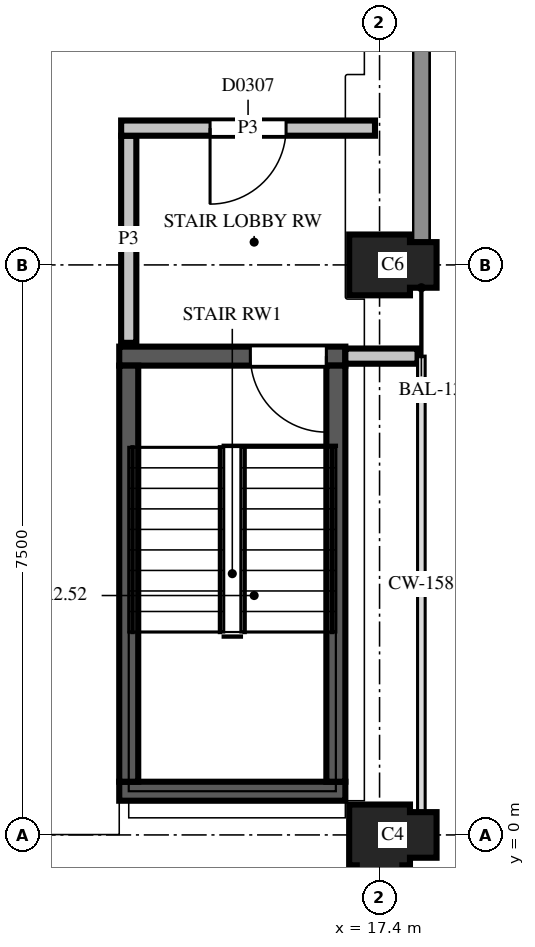
"""IFC4 building model, lengths in metres.
Left out: names, types, materials, properties, quantities, classifications, styles, units other than length and angle.
Written with IfcOpenShell. Run it as: python <this file> out.ifc"""

import sys

from ifc_helpers import new_model, si_unit, direction, frame, frame_2d, origin, place, context, subcontext, project, spatial, polyline, rectangle, outline, extrude, element, fill, save


model = new_model("IFC4")
c1 = context("Model", 3, precision=1e-05, world=origin(), true_north=direction((0.0, 1.0)))
c2 = subcontext(c1, "Body", "Model", "MODEL_VIEW")
j1 = project(units=[si_unit("LENGTHUNIT", "METRE"), si_unit("PLANEANGLEUNIT", "RADIAN")], contexts=[c1])
p1 = place(None, origin())
s1 = spatial("IfcSite", under=j1, at=p1, CompositionType="ELEMENT")
p2 = place(p1, origin())
s2 = spatial("IfcBuilding", under=s1, at=p2, CompositionType="ELEMENT")
p3 = place(p2, frame((0.0, 0.0, 11.9)))
s3 = spatial("IfcBuildingStorey", under=s2, at=p3, CompositionType="ELEMENT", Elevation=11.9)
p4 = place(p3, frame((17.4, 0.0, 0.0), z_axis=(0.0, 0.0, 1.0), x_axis=(0.0, -1.0, 0.0)))
e1 = element("IfcColumn", 1, at=p4, inside=s3, PredefinedType="COLUMN", context=c2, shape_type="SweptSolid", body=[
    extrude(outline(polyline([(-0.4, -0.4), (0.4, -0.4), (0.4, -0.3), (0.75, -0.3), (0.75, 0.3), (0.4, 0.3), (0.4, 0.4), (0.3, 0.4), (0.3, 0.75), (-0.3, 0.75), (-0.3, 0.4), (-0.4, 0.4), (-0.4, -0.4)])), origin(), (0.0, 0.0, 1.0), 3.7),
])
p5 = place(p3, frame((17.4, 7.5, 0.0), z_axis=(0.0, 0.0, 1.0), x_axis=(1.0, 0.0, 0.0)))
e2 = element("IfcColumn", 2, at=p5, inside=s3, PredefinedType="COLUMN", context=c2, shape_type="SweptSolid", body=[
    extrude(outline(polyline([(-0.4, -0.4), (0.4, -0.4), (0.4, -0.3), (0.75, -0.3), (0.75, 0.3), (0.4, 0.3), (0.4, 0.4), (-0.4, 0.4), (-0.4, -0.4)])), origin(), (0.0, 0.0, 1.0), 3.7),
])
p6 = place(p3, frame((13.975, 0.575, 0.0), z_axis=(0.0, 0.0, 1.0), x_axis=(1.0, 0.0, 0.0)))
e3 = element("IfcWall", 3, at=p6, inside=s3, PredefinedType="SHEAR", context=c2, shape_type="SweptSolid", body=[
    extrude(rectangle(XDim=2.975, YDim=0.25, at=frame_2d((1.487, 0.0))), origin(), (0.0, 0.0, 1.0), 3.7),
])
p7 = place(p3, frame((13.975, 6.3, 0.0), z_axis=(0.0, 0.0, 1.0), x_axis=(1.0, 0.0, 0.0)))
e4 = element("IfcWall", 4, at=p7, inside=s3, PredefinedType="SHEAR", context=c2, shape_type="SweptSolid", body=[
    extrude(rectangle(XDim=2.975, YDim=0.25, at=frame_2d((1.487, 0.0))), origin(), (0.0, 0.0, 1.0), 3.7),
])
p8 = place(p7, frame((1.725, 0.0, 0.0)))
e5 = element("IfcOpeningElement", 5, at=p8, cuts=e4, PredefinedType="OPENING", context=c2, shape_type="SweptSolid", body=[
    extrude(rectangle(XDim=1.0, YDim=2.1, at=frame_2d((0.5, 1.05))), frame((0.0, 0.135, 0.0), z_axis=(0.0, -1.0, 0.0), x_axis=(1.0, 0.0, 0.0)), (0.0, 0.0, 1.0), 0.27),
])
for number, where, z_axis, x_axis in (
    (6, (14.1, 0.7, 0.0), (0.0, 0.0, 1.0), (0.0, 1.0, 0.0)),
    (7, (16.825, 0.7, 0.0), (0.0, 0.0, 1.0), (0.0, 1.0, 0.0)),
):
    element("IfcWall", number, at=place(p3, frame(where, z_axis=z_axis, x_axis=x_axis)), inside=s3, PredefinedType="SHEAR", context=c2, shape_type="SweptSolid", body=[
        extrude(rectangle(XDim=5.475, YDim=0.25, at=frame_2d((2.738, 0.0))), origin(), (0.0, 0.0, 1.0), 3.7),
    ])
p9 = place(p3, frame((16.95, 6.3, 0.0), z_axis=(0.0, 0.0, 1.0), x_axis=(1.0, 0.0, 0.0)))
e8 = element("IfcWall", 8, at=p9, inside=s3, PredefinedType="PARTITIONING", context=c2, shape_type="SweptSolid", body=[
    extrude(rectangle(XDim=0.95, YDim=0.2, at=frame_2d((0.475, 0.0))), origin(), (0.0, 0.0, 1.0), 2.88),
])
p10 = place(p3, frame((14.1, 9.2, 0.0), z_axis=(0.0, 0.0, 1.0), x_axis=(0.0, -1.0, 0.0)))
e9 = element("IfcWall", 9, at=p10, inside=s3, PredefinedType="PARTITIONING", context=c2, shape_type="SweptSolid", body=[
    extrude(rectangle(XDim=2.725, YDim=0.2, at=frame_2d((1.362, 0.0))), origin(), (0.0, 0.0, 1.0), 2.88),
])
p11 = place(p3, frame((17.34, 9.3, 0.0), z_axis=(0.0, 0.0, 1.0), x_axis=(-1.0, 0.0, 0.0)))
e10 = element("IfcWall", 10, at=p11, inside=s3, PredefinedType="PARTITIONING", context=c2, shape_type="SweptSolid", body=[
    extrude(rectangle(XDim=3.34, YDim=0.2, at=frame_2d((1.67, 0.0))), origin(), (0.0, 0.0, 1.0), 2.88),
])
p12 = place(p11, frame((1.17, 0.0, 0.0)))
e11 = element("IfcOpeningElement", 11, at=p12, cuts=e10, PredefinedType="OPENING", context=c2, shape_type="SweptSolid", body=[
    extrude(rectangle(XDim=1.0, YDim=2.1, at=frame_2d((0.5, 1.05))), frame((0.0, 0.11, 0.0), z_axis=(0.0, -1.0, 0.0), x_axis=(1.0, 0.0, 0.0)), (0.0, 0.0, 1.0), 0.22),
])
p13 = place(p12, origin())
e12 = element("IfcDoor", 12, at=p13, inside=s3, OperationType="SINGLE_SWING_LEFT", PredefinedType="DOOR", context=c2, shape_type="SweptSolid", body=[
    extrude(rectangle(XDim=1.0, YDim=2.1, at=frame_2d((0.5, 1.05))), frame((0.0, 0.025, 0.0), z_axis=(0.0, -1.0, 0.0), x_axis=(1.0, 0.0, 0.0)), (0.0, 0.0, 1.0), 0.05),
])
fill(e11, e12)
p14 = place(p8, origin())
e13 = element("IfcDoor", 13, at=p14, inside=s3, OperationType="SINGLE_SWING_RIGHT", PredefinedType="DOOR", context=c2, shape_type="SweptSolid", body=[
    extrude(rectangle(XDim=1.0, YDim=2.1, at=frame_2d((0.5, 1.05))), frame((0.0, 0.025, 0.0), z_axis=(0.0, -1.0, 0.0), x_axis=(1.0, 0.0, 0.0)), (0.0, 0.0, 1.0), 0.05),
])
fill(e5, e13)
save(model, sys.argv[1])
